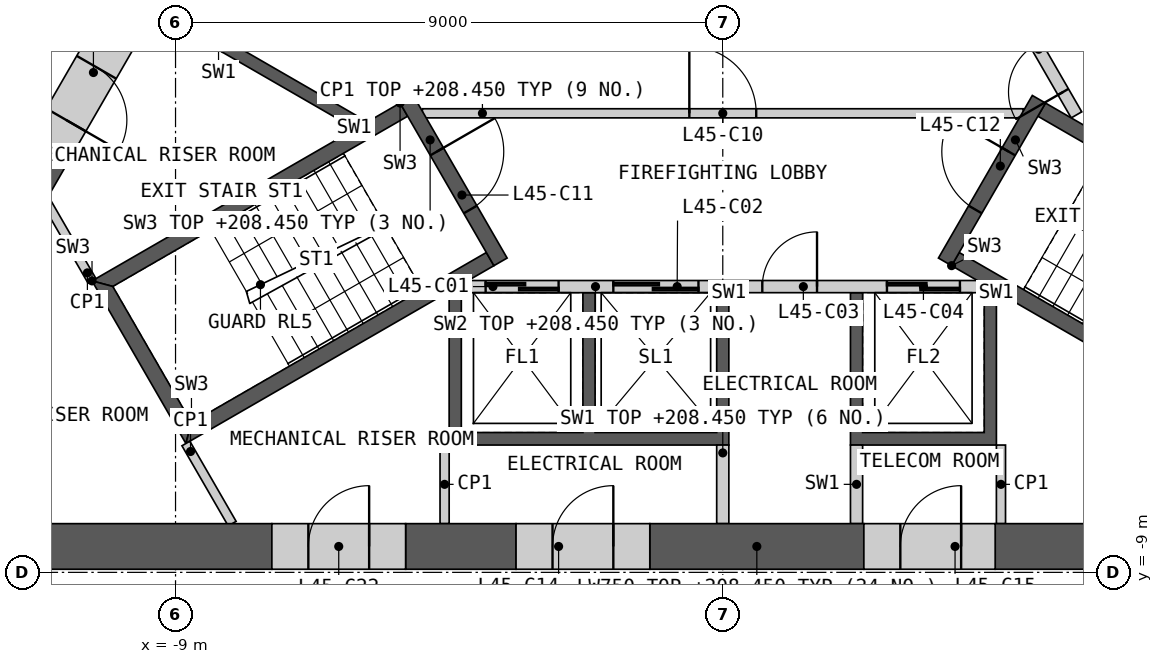
"""IFC4 building model, lengths in metres.
Left out: names, types, materials, properties, quantities, classifications, styles, units other than length and angle.
Written with IfcOpenShell. Run it as: python <this file> out.ifc"""

import sys

from ifc_helpers import new_model, si_unit, direction, frame, frame_2d, origin, place, context, subcontext, project, spatial, polyline, rectangle, outline, extrude, element, fill, save


model = new_model("IFC4")
c1 = context("Model", 3, precision=1e-05, world=origin(), true_north=direction((0.0, 1.0)))
c2 = subcontext(c1, "Body", "Model", "MODEL_VIEW")
j1 = project(units=[si_unit("LENGTHUNIT", "METRE"), si_unit("PLANEANGLEUNIT", "RADIAN")], contexts=[c1])
p1 = place(None, origin())
s1 = spatial("IfcSite", under=j1, at=p1, CompositionType="ELEMENT")
p2 = place(p1, origin())
s2 = spatial("IfcBuilding", under=s1, at=p2, CompositionType="ELEMENT")
p3 = place(p2, frame((0.0, 0.0, 205.2)))
s3 = spatial("IfcBuildingStorey", under=s2, at=p3, CompositionType="ELEMENT", Elevation=205.2)
p4 = place(p3, origin())
e1 = element("IfcWall", 1, at=p4, inside=s3, PredefinedType="SHEAR", context=c2, shape_type="SweptSolid", body=[
    extrude(outline(polyline([(4.5, -4.4), (4.5, -6.906), (2.1, -6.906), (2.1, -4.4), (2.3, -4.4), (2.3, -6.7), (4.3, -6.7), (4.3, -4.4), (4.5, -4.4)])), origin(), (0.0, 0.0, 1.0), 3.25),
])
p5 = place(p3, origin())
e2 = element("IfcWall", 2, at=p5, inside=s3, PredefinedType="SHEAR", context=c2, shape_type="SweptSolid", body=[
    extrude(outline(polyline([(0.1, -4.4), (0.1, -6.906), (-4.5, -6.906), (-4.5, -4.4), (-4.3, -4.4), (-4.3, -6.7), (-2.3, -6.7), (-2.3, -4.4), (-2.1, -4.4), (-2.1, -6.7), (-0.1, -6.7), (-0.1, -4.4), (0.1, -4.4)])), origin(), (0.0, 0.0, 1.0), 3.25),
])
p6 = place(p3, frame((-4.187, -4.3, 0.0), z_axis=(0.0, 0.0, 1.0), x_axis=(1.0, 0.0, 0.0)))
e3 = element("IfcWall", 3, at=p6, inside=s3, PredefinedType="SOLIDWALL", context=c2, shape_type="SweptSolid", body=[
    extrude(rectangle(XDim=8.373, YDim=0.2, at=frame_2d((4.187, 0.0))), origin(), (0.0, 0.0, 1.0), 3.25),
])
p7 = place(p6, frame((0.287, 0.0, 0.0)))
e4 = element("IfcOpeningElement", 4, at=p7, cuts=e3, PredefinedType="OPENING", context=c2, shape_type="SweptSolid", body=[
    extrude(rectangle(XDim=1.2, YDim=2.1, at=frame_2d((0.6, 1.05))), frame((0.0, 0.11, 0.0), z_axis=(0.0, -1.0, 0.0), x_axis=(1.0, 0.0, 0.0)), (0.0, 0.0, 1.0), 0.22),
])
p8 = place(p6, frame((2.387, 0.0, 0.0)))
e5 = element("IfcOpeningElement", 5, at=p8, cuts=e3, PredefinedType="OPENING", context=c2, shape_type="SweptSolid", body=[
    extrude(rectangle(XDim=1.4, YDim=2.1, at=frame_2d((0.7, 1.05))), frame((0.0, 0.11, 0.0), z_axis=(0.0, -1.0, 0.0), x_axis=(1.0, 0.0, 0.0)), (0.0, 0.0, 1.0), 0.22),
])
p9 = place(p6, frame((4.837, 0.0, 0.0)))
e6 = element("IfcOpeningElement", 6, at=p9, cuts=e3, PredefinedType="OPENING", context=c2, shape_type="SweptSolid", body=[
    extrude(rectangle(XDim=0.9, YDim=2.1, at=frame_2d((0.45, 1.05))), frame((0.0, 0.11, 0.0), z_axis=(0.0, -1.0, 0.0), x_axis=(1.0, 0.0, 0.0)), (0.0, 0.0, 1.0), 0.22),
])
p10 = place(p6, frame((6.887, 0.0, 0.0)))
e7 = element("IfcOpeningElement", 7, at=p10, cuts=e3, PredefinedType="OPENING", context=c2, shape_type="SweptSolid", body=[
    extrude(rectangle(XDim=1.2, YDim=2.1, at=frame_2d((0.6, 1.05))), frame((0.0, 0.11, 0.0), z_axis=(0.0, -1.0, 0.0), x_axis=(1.0, 0.0, 0.0)), (0.0, 0.0, 1.0), 0.22),
])
for number, where, z_axis, x_axis in (
    (8, (0.0, -6.906, 0.0), (0.0, 0.0, 1.0), (0.0, -1.0, 0.0)),
    (9, (2.2, -6.906, 0.0), (0.0, 0.0, 1.0), (0.0, -1.0, 0.0)),
):
    element("IfcWall", number, at=place(p3, frame(where, z_axis=z_axis, x_axis=x_axis)), inside=s3, PredefinedType="SHEAR", context=c2, shape_type="SweptSolid", body=[
        extrude(rectangle(XDim=1.293, YDim=0.2, at=frame_2d((0.646, 0.0))), origin(), (0.0, 0.0, 1.0), 3.25),
    ])
p11 = place(p3, frame((5.817, -1.476, 0.0), z_axis=(0.0, 0.0, 1.0), x_axis=(-0.500002616675, 0.866023893041, 0.0)))
e10 = element("IfcWall", 10, at=p11, inside=s3, PredefinedType="SOLIDWALL", context=c2, shape_type="SweptSolid", body=[
    extrude(rectangle(XDim=8.373, YDim=0.2, at=frame_2d((4.187, 0.0))), origin(), (0.0, 0.0, 1.0), 3.25),
])
p12 = place(p11, frame((0.437, 0.0, 0.0)))
e11 = element("IfcOpeningElement", 11, at=p12, cuts=e10, PredefinedType="OPENING", context=c2, shape_type="SweptSolid", body=[
    extrude(rectangle(XDim=0.9, YDim=2.1, at=frame_2d((0.45, 1.05))), frame((0.0, 0.11, 0.0), z_axis=(0.0, -1.0, 0.0), x_axis=(1.0, 0.0, 0.0)), (0.0, 0.0, 1.0), 0.22),
])
p13 = place(p11, frame((3.737, 0.0, 0.0)))
e12 = element("IfcOpeningElement", 12, at=p13, cuts=e10, PredefinedType="OPENING", context=c2, shape_type="SweptSolid", body=[
    extrude(rectangle(XDim=0.9, YDim=2.1, at=frame_2d((0.45, 1.05))), frame((0.0, 0.11, 0.0), z_axis=(0.0, -1.0, 0.0), x_axis=(1.0, 0.0, 0.0)), (0.0, 0.0, 1.0), 0.22),
])
p14 = place(p11, frame((6.937, 0.0, 0.0)))
e13 = element("IfcOpeningElement", 13, at=p14, cuts=e10, PredefinedType="OPENING", context=c2, shape_type="SweptSolid", body=[
    extrude(rectangle(XDim=1.1, YDim=2.1, at=frame_2d((0.55, 1.05))), frame((0.0, 0.11, 0.0), z_axis=(0.0, -1.0, 0.0), x_axis=(1.0, 0.0, 0.0)), (0.0, 0.0, 1.0), 0.22),
])
p15 = place(p3, origin())
e14 = element("IfcWall", 14, at=p15, inside=s3, PredefinedType="SHEAR", context=c2, shape_type="SweptSolid", body=[
    extrude(outline(polyline([(-6.061, -1.697), (-8.231, -0.444), (-8.131, -0.271), (-5.96, -1.524), (-6.061, -1.697)])), origin(), (0.0, 0.0, 1.0), 3.25),
])
p16 = place(p3, frame((-4.941, -1.45, 0.0), z_axis=(0.0, 0.0, 1.0), x_axis=(1.0, 0.0, 0.0)))
e15 = element("IfcWall", 15, at=p16, inside=s3, PredefinedType="PARTITIONING", context=c2, shape_type="SweptSolid", body=[
    extrude(rectangle(XDim=9.882, YDim=0.15, at=frame_2d((4.941, 0.0))), origin(), (0.0, 0.0, 1.0), 3.25),
])
p17 = place(p16, frame((4.391, 0.0, 0.0)))
e16 = element("IfcOpeningElement", 16, at=p17, cuts=e15, PredefinedType="OPENING", context=c2, shape_type="SweptSolid", body=[
    extrude(rectangle(XDim=1.1, YDim=2.1, at=frame_2d((0.55, 1.05))), frame((0.0, 0.085, 0.0), z_axis=(0.0, -1.0, 0.0), x_axis=(1.0, 0.0, 0.0)), (0.0, 0.0, 1.0), 0.17),
])
p18 = place(p3, origin())
e17 = element("IfcWall", 17, at=p18, inside=s3, PredefinedType="SHEAR", context=c2, shape_type="SweptSolid", body=[
    extrude(outline(polyline([(-5.307, -1.281), (-10.374, -4.206), (-10.032, -4.298), (-5.182, -1.498), (-5.307, -1.281)])), origin(), (0.0, 0.0, 1.0), 3.25),
])
p19 = place(p3, origin())
e18 = element("IfcWall", 18, at=p19, inside=s3, PredefinedType="SHEAR", context=c2, shape_type="SweptSolid", body=[
    extrude(outline(polyline([(-10.374, -4.206), (-8.83, -6.881), (-8.738, -6.539), (-10.032, -4.298), (-10.374, -4.206)])), origin(), (0.0, 0.0, 1.0), 3.25),
])
p20 = place(p3, origin())
e19 = element("IfcWall", 19, at=p20, inside=s3, PredefinedType="SHEAR", context=c2, shape_type="SweptSolid", body=[
    extrude(outline(polyline([(-8.738, -6.539), (-8.83, -6.881), (-3.763, -3.956), (-3.888, -3.739), (-8.738, -6.539)])), origin(), (0.0, 0.0, 1.0), 3.25),
])
p21 = place(p3, frame((-5.199, -1.219, 0.0), z_axis=(0.0, 0.0, 1.0), x_axis=(0.499982516597, -0.866035497597, 0.0)))
e20 = element("IfcWall", 20, at=p21, inside=s3, PredefinedType="SHEAR", context=c2, shape_type="SweptSolid", body=[
    extrude(rectangle(XDim=3.088, YDim=0.25, at=frame_2d((1.544, 0.0))), origin(), (0.0, 0.0, 1.0), 3.25),
])
p22 = place(p21, frame((0.994, 0.0, 0.0)))
e21 = element("IfcOpeningElement", 21, at=p22, cuts=e20, PredefinedType="OPENING", context=c2, shape_type="SweptSolid", body=[
    extrude(rectangle(XDim=1.1, YDim=2.1, at=frame_2d((0.55, 1.05))), frame((0.0, 0.135, 0.0), z_axis=(0.0, -1.0, 0.0), x_axis=(1.0, 0.0, 0.0)), (0.0, 0.0, 1.0), 0.27),
])
p23 = place(p3, origin())
e22 = element("IfcWall", 22, at=p23, inside=s3, PredefinedType="SHEAR", context=c2, shape_type="SweptSolid", body=[
    extrude(outline(polyline([(3.763, -3.956), (8.83, -6.881), (8.738, -6.539), (3.888, -3.739), (3.763, -3.956)])), origin(), (0.0, 0.0, 1.0), 3.25),
])
p24 = place(p3, origin())
e23 = element("IfcWall", 23, at=p24, inside=s3, PredefinedType="SHEAR", context=c2, shape_type="SweptSolid", body=[
    extrude(outline(polyline([(10.032, -4.298), (10.374, -4.206), (5.307, -1.281), (5.182, -1.498), (10.032, -4.298)])), origin(), (0.0, 0.0, 1.0), 3.25),
])
p25 = place(p3, frame((3.655, -3.893, 0.0), z_axis=(0.0, 0.0, 1.0), x_axis=(0.499982516597, 0.866035497597, 0.0)))
e24 = element("IfcWall", 24, at=p25, inside=s3, PredefinedType="SHEAR", context=c2, shape_type="SweptSolid", body=[
    extrude(rectangle(XDim=3.088, YDim=0.25, at=frame_2d((1.544, 0.0))), origin(), (0.0, 0.0, 1.0), 3.25),
])
p26 = place(p25, frame((0.994, 0.0, 0.0)))
e25 = element("IfcOpeningElement", 25, at=p26, cuts=e24, PredefinedType="OPENING", context=c2, shape_type="SweptSolid", body=[
    extrude(rectangle(XDim=1.1, YDim=2.1, at=frame_2d((0.55, 1.05))), frame((0.0, 0.135, 0.0), z_axis=(0.0, -1.0, 0.0), x_axis=(1.0, 0.0, 0.0)), (0.0, 0.0, 1.0), 0.27),
])
for number, where, z_axis, x_axis in (
    (26, (4.575, -6.906, 0.0), (0.0, 0.0, 1.0), (0.0, -1.0, 0.0)),
    (27, (-4.575, -6.906, 0.0), (0.0, 0.0, 1.0), (0.0, -1.0, 0.0)),
):
    element("IfcWall", number, at=place(p3, frame(where, z_axis=z_axis, x_axis=x_axis)), inside=s3, PredefinedType="PARTITIONING", context=c2, shape_type="SweptSolid", body=[
        extrude(rectangle(XDim=1.293, YDim=0.15, at=frame_2d((0.646, 0.0))), origin(), (0.0, 0.0, 1.0), 3.25),
    ])
for number, where, z_axis, x_axis in (
    (28, (-8.83, -6.881, 0.0), (0.0, 0.0, 1.0), (0.5, -0.866, 0.0)),
    (29, (-10.374, -4.206, 0.0), (0.0, 0.0, 1.0), (-0.5, 0.866, 0.0)),
):
    element("IfcWall", number, at=place(p3, frame(where, z_axis=z_axis, x_axis=x_axis)), inside=s3, PredefinedType="PARTITIONING", context=c2, shape_type="SweptSolid", body=[
        extrude(rectangle(XDim=1.522, YDim=0.15, at=frame_2d((0.761, 0.0))), origin(), (0.0, 0.0, 1.0), 3.25),
    ])
p27 = place(p3, frame((-14.201, -8.574, 0.0), z_axis=(0.0, 0.0, 1.0), x_axis=(1.0, 0.0, 0.0)))
e30 = element("IfcWall", 30, at=p27, inside=s3, PredefinedType="SHEAR", context=c2, shape_type="SweptSolid", body=[
    extrude(rectangle(XDim=6.785, YDim=0.75, at=frame_2d((3.393, 0.0))), origin(), (0.0, 0.0, 1.0), 3.25),
])
p28 = place(p3, frame((4.48, -8.574, 0.0), z_axis=(0.0, 0.0, 1.0), x_axis=(1.0, 0.0, 0.0)))
e31 = element("IfcWall", 31, at=p28, inside=s3, PredefinedType="SHEAR", context=c2, shape_type="SweptSolid", body=[
    extrude(rectangle(XDim=3.845, YDim=0.75, at=frame_2d((1.923, 0.0))), origin(), (0.0, 0.0, 1.0), 3.25),
])
p29 = place(p3, frame((-1.2, -8.574, 0.0), z_axis=(0.0, 0.0, 1.0), x_axis=(1.0, 0.0, 0.0)))
e32 = element("IfcWall", 32, at=p29, inside=s3, PredefinedType="SHEAR", context=c2, shape_type="SweptSolid", body=[
    extrude(rectangle(XDim=3.52, YDim=0.75, at=frame_2d((1.76, 0.0))), origin(), (0.0, 0.0, 1.0), 3.25),
])
p30 = place(p3, frame((-5.216, -8.574, 0.0), z_axis=(0.0, 0.0, 1.0), x_axis=(1.0, 0.0, 0.0)))
e33 = element("IfcWall", 33, at=p30, inside=s3, PredefinedType="SHEAR", context=c2, shape_type="SweptSolid", body=[
    extrude(rectangle(XDim=1.816, YDim=0.75, at=frame_2d((0.908, 0.0))), origin(), (0.0, 0.0, 1.0), 3.25),
])
p31 = place(p3, frame((-11.096, -2.07, 0.0), z_axis=(0.0, 0.0, 1.0), x_axis=(-0.49992834617, -0.86606676919, 0.0)))
e34 = element("IfcWall", 34, at=p31, inside=s3, PredefinedType="SHEAR", context=c2, shape_type="SweptSolid", body=[
    extrude(rectangle(XDim=2.737, YDim=0.75, at=frame_2d((1.369, 0.0))), origin(), (0.0, 0.0, 1.0), 3.25),
])
p32 = place(p3, frame((-3.4, -8.574, 0.0), z_axis=(0.0, 0.0, 1.0), x_axis=(1.0, 0.0, 0.0)))
e35 = element("IfcWall", 35, at=p32, inside=s3, PredefinedType="SHEAR", context=c2, shape_type="SweptSolid", body=[
    extrude(rectangle(XDim=2.2, YDim=0.75, at=frame_2d((1.1, 0.0))), origin(), (0.0, 0.0, 1.0), 3.25),
])
p33 = place(p32, frame((0.6, 0.0, 0.0)))
e36 = element("IfcOpeningElement", 36, at=p33, cuts=e35, PredefinedType="OPENING", context=c2, shape_type="SweptSolid", body=[
    extrude(rectangle(XDim=1.0, YDim=2.1, at=frame_2d((0.5, 1.05))), frame((0.0, 0.385, 0.0), z_axis=(0.0, -1.0, 0.0), x_axis=(1.0, 0.0, 0.0)), (0.0, 0.0, 1.0), 0.77),
])
p34 = place(p3, frame((2.32, -8.574, 0.0), z_axis=(0.0, 0.0, 1.0), x_axis=(1.0, 0.0, 0.0)))
e37 = element("IfcWall", 37, at=p34, inside=s3, PredefinedType="SHEAR", context=c2, shape_type="SweptSolid", body=[
    extrude(rectangle(XDim=2.16, YDim=0.75, at=frame_2d((1.08, 0.0))), origin(), (0.0, 0.0, 1.0), 3.25),
])
p35 = place(p34, frame((0.6, 0.0, 0.0)))
e38 = element("IfcOpeningElement", 38, at=p35, cuts=e37, PredefinedType="OPENING", context=c2, shape_type="SweptSolid", body=[
    extrude(rectangle(XDim=1.0, YDim=2.1, at=frame_2d((0.5, 1.05))), frame((0.0, 0.385, 0.0), z_axis=(0.0, -1.0, 0.0), x_axis=(1.0, 0.0, 0.0)), (0.0, 0.0, 1.0), 0.77),
])
p36 = place(p3, frame((-9.625, 0.477, 0.0), z_axis=(0.0, 0.0, 1.0), x_axis=(-0.500005104963, -0.866022456413, 0.0)))
e39 = element("IfcWall", 39, at=p36, inside=s3, PredefinedType="SHEAR", context=c2, shape_type="SweptSolid", body=[
    extrude(rectangle(XDim=2.941, YDim=0.75, at=frame_2d((1.47, 0.0))), origin(), (0.0, 0.0, 1.0), 3.25),
])
p37 = place(p36, frame((1.35, 0.0, 0.0)))
e40 = element("IfcOpeningElement", 40, at=p37, cuts=e39, PredefinedType="OPENING", context=c2, shape_type="SweptSolid", body=[
    extrude(rectangle(XDim=1.0, YDim=2.1, at=frame_2d((0.5, 1.05))), frame((0.0, 0.385, 0.0), z_axis=(0.0, -1.0, 0.0), x_axis=(1.0, 0.0, 0.0)), (0.0, 0.0, 1.0), 0.77),
])
p38 = place(p3, frame((-7.416, -8.574, 0.0), z_axis=(0.0, 0.0, 1.0), x_axis=(1.0, 0.0, 0.0)))
e41 = element("IfcWall", 41, at=p38, inside=s3, PredefinedType="SHEAR", context=c2, shape_type="SweptSolid", body=[
    extrude(rectangle(XDim=2.2, YDim=0.75, at=frame_2d((1.1, 0.0))), origin(), (0.0, 0.0, 1.0), 3.25),
])
p39 = place(p38, frame((0.6, 0.0, 0.0)))
e42 = element("IfcOpeningElement", 42, at=p39, cuts=e41, PredefinedType="OPENING", context=c2, shape_type="SweptSolid", body=[
    extrude(rectangle(XDim=1.0, YDim=2.1, at=frame_2d((0.5, 1.05))), frame((0.0, 0.385, 0.0), z_axis=(0.0, -1.0, 0.0), x_axis=(1.0, 0.0, 0.0)), (0.0, 0.0, 1.0), 0.77),
])
p40 = place(p3, frame((-14.619, -2.624, 0.0), z_axis=(0.0, 0.0, 1.0), x_axis=(0.50000393355, 0.866023132736, 0.0)))
e43 = element("IfcWall", 43, at=p40, inside=s3, PredefinedType="PARTITIONING", context=c2, shape_type="SweptSolid", body=[
    extrude(rectangle(XDim=9.335, YDim=0.2, at=frame_2d((4.667, 0.0))), origin(), (0.0, 0.0, 1.0), 3.25),
])
p41 = place(p40, frame((3.163, 0.0, 0.0)))
e44 = element("IfcOpeningElement", 44, at=p41, cuts=e43, PredefinedType="OPENING", context=c2, shape_type="SweptSolid", body=[
    extrude(rectangle(XDim=1.0, YDim=2.1, at=frame_2d((0.5, 1.05))), frame((0.0, 0.11, 0.0), z_axis=(0.0, -1.0, 0.0), x_axis=(1.0, 0.0, 0.0)), (0.0, 0.0, 1.0), 0.22),
])
p42 = place(p7, origin())
e45 = element("IfcDoor", 45, at=p42, inside=s3, OperationType="SLIDING_TO_LEFT", PredefinedType="DOOR", context=c2, shape_type="SweptSolid", body=[
    extrude(rectangle(XDim=1.2, YDim=2.1, at=frame_2d((0.6, 1.05))), frame((0.0, 0.025, 0.0), z_axis=(0.0, -1.0, 0.0), x_axis=(1.0, 0.0, 0.0)), (0.0, 0.0, 1.0), 0.05),
])
fill(e4, e45)
p43 = place(p8, origin())
e46 = element("IfcDoor", 46, at=p43, inside=s3, OperationType="SLIDING_TO_LEFT", PredefinedType="DOOR", context=c2, shape_type="SweptSolid", body=[
    extrude(rectangle(XDim=1.4, YDim=2.1, at=frame_2d((0.7, 1.05))), frame((0.0, 0.025, 0.0), z_axis=(0.0, -1.0, 0.0), x_axis=(1.0, 0.0, 0.0)), (0.0, 0.0, 1.0), 0.05),
])
fill(e5, e46)
p44 = place(p9, origin())
e47 = element("IfcDoor", 47, at=p44, inside=s3, OperationType="SINGLE_SWING_RIGHT", PredefinedType="DOOR", context=c2, shape_type="SweptSolid", body=[
    extrude(rectangle(XDim=0.9, YDim=2.1, at=frame_2d((0.45, 1.05))), frame((0.0, 0.025, 0.0), z_axis=(0.0, -1.0, 0.0), x_axis=(1.0, 0.0, 0.0)), (0.0, 0.0, 1.0), 0.05),
])
fill(e6, e47)
p45 = place(p10, origin())
e48 = element("IfcDoor", 48, at=p45, inside=s3, OperationType="SLIDING_TO_LEFT", PredefinedType="DOOR", context=c2, shape_type="SweptSolid", body=[
    extrude(rectangle(XDim=1.2, YDim=2.1, at=frame_2d((0.6, 1.05))), frame((0.0, 0.025, 0.0), z_axis=(0.0, -1.0, 0.0), x_axis=(1.0, 0.0, 0.0)), (0.0, 0.0, 1.0), 0.05),
])
fill(e7, e48)
p46 = place(p12, origin())
e49 = element("IfcDoor", 49, at=p46, inside=s3, OperationType="SINGLE_SWING_LEFT", PredefinedType="DOOR", context=c2, shape_type="SweptSolid", body=[
    extrude(rectangle(XDim=0.9, YDim=2.1, at=frame_2d((0.45, 1.05))), frame((0.0, 0.025, 0.0), z_axis=(0.0, -1.0, 0.0), x_axis=(1.0, 0.0, 0.0)), (0.0, 0.0, 1.0), 0.05),
])
fill(e11, e49)
p47 = place(p17, origin())
e50 = element("IfcDoor", 50, at=p47, inside=s3, OperationType="SINGLE_SWING_LEFT", PredefinedType="DOOR", context=c2, shape_type="SweptSolid", body=[
    extrude(rectangle(XDim=1.1, YDim=2.1, at=frame_2d((0.55, 1.05))), frame((0.0, 0.025, 0.0), z_axis=(0.0, -1.0, 0.0), x_axis=(1.0, 0.0, 0.0)), (0.0, 0.0, 1.0), 0.05),
])
fill(e16, e50)
p48 = place(p22, origin())
e51 = element("IfcDoor", 51, at=p48, inside=s3, OperationType="SINGLE_SWING_LEFT", PredefinedType="DOOR", context=c2, shape_type="SweptSolid", body=[
    extrude(rectangle(XDim=1.1, YDim=2.1, at=frame_2d((0.55, 1.05))), frame((0.0, 0.025, 0.0), z_axis=(0.0, -1.0, 0.0), x_axis=(1.0, 0.0, 0.0)), (0.0, 0.0, 1.0), 0.05),
])
fill(e21, e51)
p49 = place(p26, origin())
e52 = element("IfcDoor", 52, at=p49, inside=s3, OperationType="SINGLE_SWING_RIGHT", PredefinedType="DOOR", context=c2, shape_type="SweptSolid", body=[
    extrude(rectangle(XDim=1.1, YDim=2.1, at=frame_2d((0.55, 1.05))), frame((0.0, 0.025, 0.0), z_axis=(0.0, -1.0, 0.0), x_axis=(1.0, 0.0, 0.0)), (0.0, 0.0, 1.0), 0.05),
])
fill(e25, e52)
p50 = place(p33, origin())
e53 = element("IfcDoor", 53, at=p50, inside=s3, OperationType="SINGLE_SWING_RIGHT", PredefinedType="DOOR", context=c2, shape_type="SweptSolid", body=[
    extrude(rectangle(XDim=1.0, YDim=2.1, at=frame_2d((0.5, 1.05))), frame((0.0, 0.13, 0.0), z_axis=(0.0, -1.0, 0.0), x_axis=(1.0, 0.0, 0.0)), (0.0, 0.0, 1.0), 0.05),
])
fill(e36, e53)
p51 = place(p35, origin())
e54 = element("IfcDoor", 54, at=p51, inside=s3, OperationType="SINGLE_SWING_RIGHT", PredefinedType="DOOR", context=c2, shape_type="SweptSolid", body=[
    extrude(rectangle(XDim=1.0, YDim=2.1, at=frame_2d((0.5, 1.05))), frame((0.0, 0.13, 0.0), z_axis=(0.0, -1.0, 0.0), x_axis=(1.0, 0.0, 0.0)), (0.0, 0.0, 1.0), 0.05),
])
fill(e38, e54)
p52 = place(p37, origin())
e55 = element("IfcDoor", 55, at=p52, inside=s3, OperationType="SINGLE_SWING_RIGHT", PredefinedType="DOOR", context=c2, shape_type="SweptSolid", body=[
    extrude(rectangle(XDim=1.0, YDim=2.1, at=frame_2d((0.5, 1.05))), frame((0.0, 0.13, 0.0), z_axis=(0.0, -1.0, 0.0), x_axis=(1.0, 0.0, 0.0)), (0.0, 0.0, 1.0), 0.05),
])
fill(e40, e55)
p53 = place(p39, origin())
e56 = element("IfcDoor", 56, at=p53, inside=s3, OperationType="SINGLE_SWING_RIGHT", PredefinedType="DOOR", context=c2, shape_type="SweptSolid", body=[
    extrude(rectangle(XDim=1.0, YDim=2.1, at=frame_2d((0.5, 1.05))), frame((0.0, 0.13, 0.0), z_axis=(0.0, -1.0, 0.0), x_axis=(1.0, 0.0, 0.0)), (0.0, 0.0, 1.0), 0.05),
])
fill(e42, e56)
save(model, sys.argv[1])
